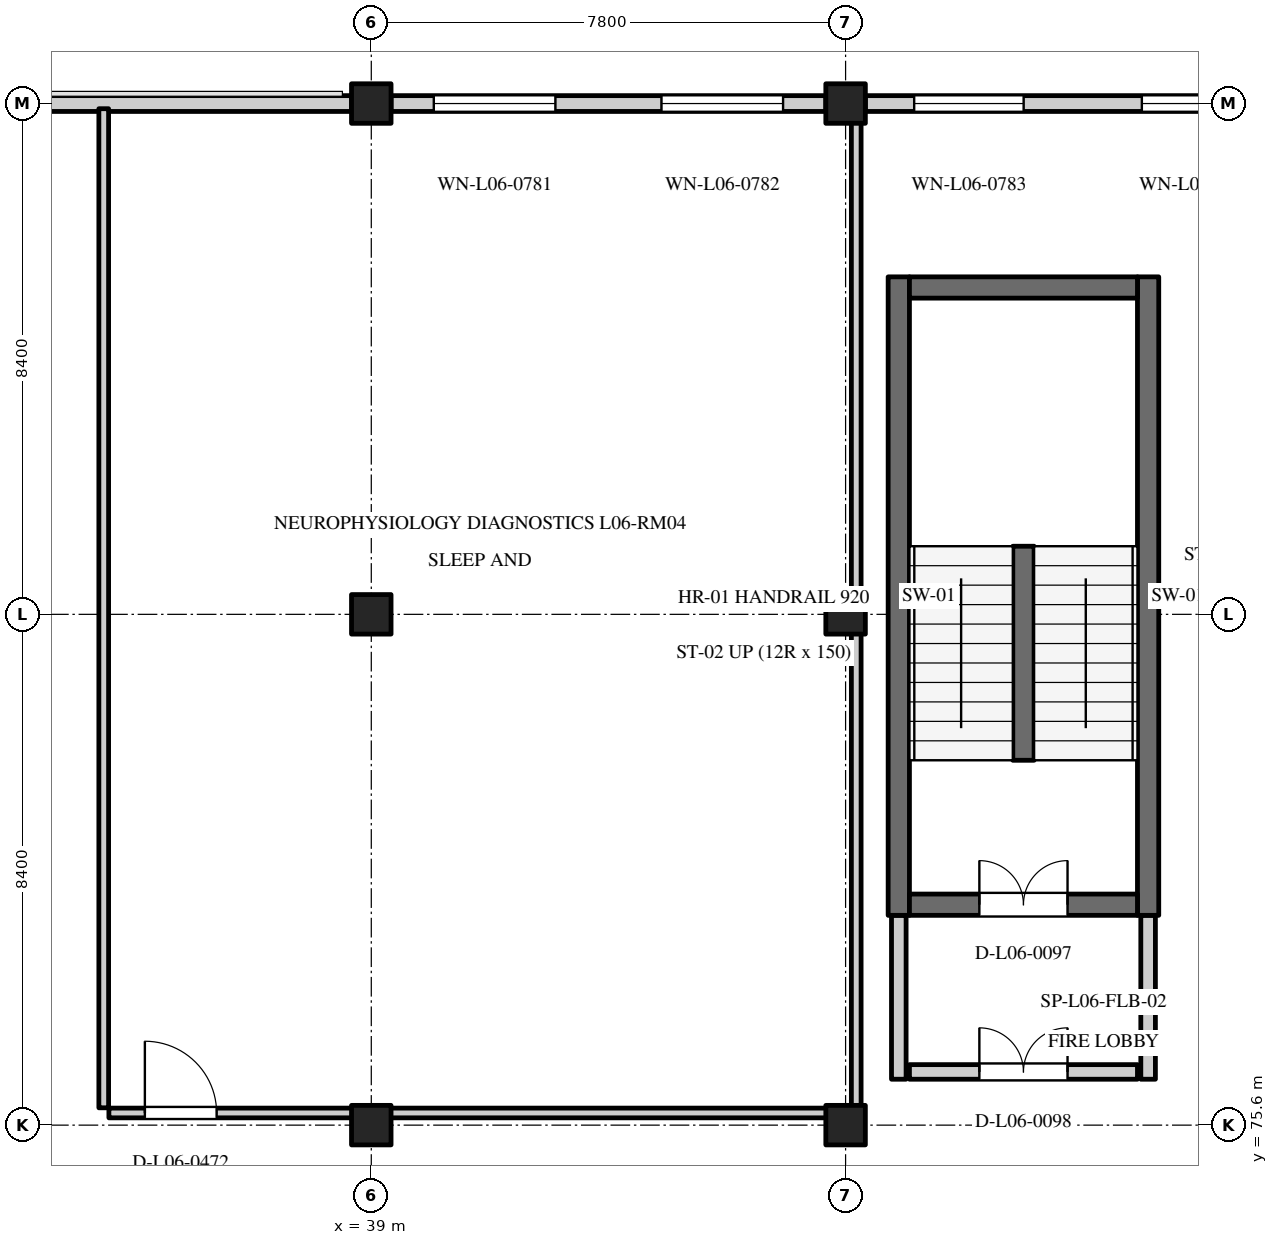
"""IFC4 building model, lengths in metres.
Left out: names, types, materials, properties, quantities, classifications, styles, units other than length and angle.
Written with IfcOpenShell. Run it as: python <this file> out.ifc"""

import sys

from ifc_helpers import new_model, si_unit, direction, frame, frame_2d, origin, origin_2d, place, context, subcontext, project, spatial, rectangle, extrude, element, fill, save


model = new_model("IFC4")
c1 = context("Model", 3, precision=1e-05, world=origin(), true_north=direction((0.0, 1.0)))
c2 = subcontext(c1, "Body", "Model", "MODEL_VIEW")
j1 = project(units=[si_unit("LENGTHUNIT", "METRE"), si_unit("PLANEANGLEUNIT", "RADIAN")], contexts=[c1])
p1 = place(None, origin())
s1 = spatial("IfcSite", under=j1, at=p1, CompositionType="ELEMENT")
p2 = place(p1, origin())
s2 = spatial("IfcBuilding", under=s1, at=p2, CompositionType="ELEMENT")
p3 = place(p2, frame((0.0, 0.0, 26.1)))
s3 = spatial("IfcBuildingStorey", under=s2, at=p3, CompositionType="ELEMENT", Elevation=26.1)
for number, where, z_axis, x_axis in (
    (1, (39.0, 75.6, 0.0), (0.0, 0.0, 1.0), (1.0, 0.0, 0.0)),
    (2, (39.0, 84.0, 0.0), (0.0, 0.0, 1.0), (1.0, 0.0, 0.0)),
    (3, (39.0, 92.4, 0.0), (0.0, 0.0, 1.0), (1.0, 0.0, 0.0)),
    (4, (46.8, 75.6, 0.0), (0.0, 0.0, 1.0), (1.0, 0.0, 0.0)),
    (5, (46.8, 84.0, 0.0), (0.0, 0.0, 1.0), (1.0, 0.0, 0.0)),
    (6, (46.8, 92.4, 0.0), (0.0, 0.0, 1.0), (1.0, 0.0, 0.0)),
):
    element("IfcColumn", number, at=place(p3, frame(where, z_axis=z_axis, x_axis=x_axis)), inside=s3, PredefinedType="COLUMN", context=c2, shape_type="SweptSolid", body=[
        extrude(rectangle(XDim=0.65, YDim=0.65, at=origin_2d()), origin(), (0.0, 0.0, 1.0), 3.6),
    ])
p4 = place(p3, frame((31.525, 92.4, 0.0), z_axis=(0.0, 0.0, 1.0), x_axis=(1.0, 0.0, 0.0)))
e7 = element("IfcWall", 7, at=p4, inside=s3, PredefinedType="STANDARD", context=c2, shape_type="SweptSolid", body=[
    extrude(rectangle(XDim=7.15, YDim=0.26, at=frame_2d((3.575, 0.0))), origin(), (0.0, 0.0, 1.0), 2.75),
])
p5 = place(p3, frame((39.325, 92.4, 0.0), z_axis=(0.0, 0.0, 1.0), x_axis=(1.0, 0.0, 0.0)))
e8 = element("IfcWall", 8, at=p5, inside=s3, PredefinedType="STANDARD", context=c2, shape_type="SweptSolid", body=[
    extrude(rectangle(XDim=7.15, YDim=0.26, at=frame_2d((3.575, 0.0))), origin(), (0.0, 0.0, 1.0), 2.75),
])
p6 = place(p5, frame((0.703, 0.0, 0.8)))
e9 = element("IfcOpeningElement", 9, at=p6, cuts=e8, PredefinedType="OPENING", context=c2, shape_type="SweptSolid", body=[
    extrude(rectangle(XDim=2.0, YDim=1.45, at=frame_2d((1.0, 0.725))), frame((0.0, 0.142, 0.0), z_axis=(0.0, -1.0, 0.0), x_axis=(1.0, 0.0, 0.0)), (0.0, 0.0, 1.0), 0.284),
])
p7 = place(p5, frame((4.447, 0.0, 0.8)))
e10 = element("IfcOpeningElement", 10, at=p7, cuts=e8, PredefinedType="OPENING", context=c2, shape_type="SweptSolid", body=[
    extrude(rectangle(XDim=2.0, YDim=1.45, at=frame_2d((1.0, 0.725))), frame((0.0, 0.142, 0.0), z_axis=(0.0, -1.0, 0.0), x_axis=(1.0, 0.0, 0.0)), (0.0, 0.0, 1.0), 0.284),
])
p8 = place(p3, frame((47.125, 92.4, 0.0), z_axis=(0.0, 0.0, 1.0), x_axis=(1.0, 0.0, 0.0)))
e11 = element("IfcWall", 11, at=p8, inside=s3, PredefinedType="STANDARD", context=c2, shape_type="SweptSolid", body=[
    extrude(rectangle(XDim=7.125, YDim=0.26, at=frame_2d((3.562, 0.0))), origin(), (0.0, 0.0, 1.0), 2.75),
])
p9 = place(p8, frame((0.803, 0.0, 0.8)))
e12 = element("IfcOpeningElement", 12, at=p9, cuts=e11, PredefinedType="OPENING", context=c2, shape_type="SweptSolid", body=[
    extrude(rectangle(XDim=1.8, YDim=1.65, at=frame_2d((0.9, 0.825))), frame((0.0, 0.142, 0.0), z_axis=(0.0, -1.0, 0.0), x_axis=(1.0, 0.0, 0.0)), (0.0, 0.0, 1.0), 0.284),
])
p10 = place(p8, frame((4.547, 0.0, 0.8)))
e13 = element("IfcOpeningElement", 13, at=p10, cuts=e11, PredefinedType="OPENING", context=c2, shape_type="SweptSolid", body=[
    extrude(rectangle(XDim=1.8, YDim=1.65, at=frame_2d((0.9, 0.825))), frame((0.0, 0.142, 0.0), z_axis=(0.0, -1.0, 0.0), x_axis=(1.0, 0.0, 0.0)), (0.0, 0.0, 1.0), 0.284),
])
for number, where, z_axis, x_axis in (
    (14, (47.675, 79.05, 0.0), (0.0, 0.0, 1.0), (0.0, 1.0, 0.0)),
    (15, (51.775, 79.05, 0.0), (0.0, 0.0, 1.0), (0.0, 1.0, 0.0)),
):
    element("IfcWall", number, at=place(p3, frame(where, z_axis=z_axis, x_axis=x_axis)), inside=s3, PredefinedType="SHEAR", context=c2, shape_type="SweptSolid", body=[
        extrude(rectangle(XDim=10.5, YDim=0.35, at=frame_2d((5.25, 0.0))), origin(), (0.0, 0.0, 1.0), 3.6),
    ])
p11 = place(p3, frame((47.85, 89.375, 0.0), z_axis=(0.0, 0.0, 1.0), x_axis=(1.0, 0.0, 0.0)))
e16 = element("IfcWall", 16, at=p11, inside=s3, PredefinedType="SHEAR", context=c2, shape_type="SweptSolid", body=[
    extrude(rectangle(XDim=3.75, YDim=0.35, at=frame_2d((1.875, 0.0))), origin(), (0.0, 0.0, 1.0), 3.6),
])
p12 = place(p3, frame((47.85, 79.225, 0.0), z_axis=(0.0, 0.0, 1.0), x_axis=(1.0, 0.0, 0.0)))
e17 = element("IfcWall", 17, at=p12, inside=s3, PredefinedType="SHEAR", context=c2, shape_type="SweptSolid", body=[
    extrude(rectangle(XDim=3.75, YDim=0.35, at=frame_2d((1.875, 0.0))), origin(), (0.0, 0.0, 1.0), 3.3),
])
p13 = place(p12, frame((1.15, 0.0, 0.0)))
e18 = element("IfcOpeningElement", 18, at=p13, cuts=e17, PredefinedType="OPENING", context=c2, shape_type="SweptSolid", body=[
    extrude(rectangle(XDim=1.45, YDim=2.2, at=frame_2d((0.725, 1.1))), frame((0.0, 0.187, 0.0), z_axis=(0.0, -1.0, 0.0), x_axis=(1.0, 0.0, 0.0)), (0.0, 0.0, 1.0), 0.374),
])
for number, where, z_axis, x_axis in (
    (19, (47.675, 76.355, 0.0), (0.0, 0.0, 1.0), (0.0, 1.0, 0.0)),
    (20, (51.775, 76.355, 0.0), (0.0, 0.0, 1.0), (0.0, 1.0, 0.0)),
):
    element("IfcWall", number, at=place(p3, frame(where, z_axis=z_axis, x_axis=x_axis)), inside=s3, PredefinedType="STANDARD", context=c2, shape_type="SweptSolid", body=[
        extrude(rectangle(XDim=2.695, YDim=0.24, at=frame_2d((1.348, 0.0))), origin(), (0.0, 0.0, 1.0), 3.3),
    ])
p14 = place(p3, frame((47.85, 76.475, 0.0), z_axis=(0.0, 0.0, 1.0), x_axis=(1.0, 0.0, 0.0)))
e21 = element("IfcWall", 21, at=p14, inside=s3, PredefinedType="STANDARD", context=c2, shape_type="SweptSolid", body=[
    extrude(rectangle(XDim=3.75, YDim=0.24, at=frame_2d((1.875, 0.0))), origin(), (0.0, 0.0, 1.0), 3.3),
])
p15 = place(p14, frame((1.15, 0.0, 0.0)))
e22 = element("IfcOpeningElement", 22, at=p15, cuts=e21, PredefinedType="OPENING", context=c2, shape_type="SweptSolid", body=[
    extrude(rectangle(XDim=1.45, YDim=2.2, at=frame_2d((0.725, 1.1))), frame((0.0, 0.132, 0.0), z_axis=(0.0, -1.0, 0.0), x_axis=(1.0, 0.0, 0.0)), (0.0, 0.0, 1.0), 0.264),
])
p16 = place(p3, frame((49.725, 81.6, 0.0), z_axis=(0.0, 0.0, 1.0), x_axis=(0.0, 1.0, 0.0)))
e23 = element("IfcWall", 23, at=p16, inside=s3, PredefinedType="SHEAR", context=c2, shape_type="SweptSolid", body=[
    extrude(rectangle(XDim=3.52, YDim=0.35, at=frame_2d((1.76, 0.0))), origin(), (0.0, 0.0, 1.0), 3.6),
])
p17 = place(p3, frame((34.685, 75.8, 0.0), z_axis=(0.0, 0.0, 1.0), x_axis=(1.0, 0.0, 0.0)))
e24 = element("IfcWall", 24, at=p17, inside=s3, PredefinedType="PARTITIONING", context=c2, shape_type="SweptSolid", body=[
    extrude(rectangle(XDim=12.205, YDim=0.16, at=frame_2d((6.103, 0.0))), origin(), (0.0, 0.0, 1.0), 2.65),
])
p18 = place(p17, frame((0.592, 0.0, 0.0)))
e25 = element("IfcOpeningElement", 25, at=p18, cuts=e24, PredefinedType="OPENING", context=c2, shape_type="SweptSolid", body=[
    extrude(rectangle(XDim=1.18, YDim=2.2, at=frame_2d((0.59, 1.1))), frame((0.0, 0.092, 0.0), z_axis=(0.0, -1.0, 0.0), x_axis=(1.0, 0.0, 0.0)), (0.0, 0.0, 1.0), 0.184),
])
p19 = place(p3, frame((38.715, 92.4, 0.0), z_axis=(0.0, 0.0, 1.0), x_axis=(1.0, 0.0, 0.0)))
e26 = element("IfcWall", 26, at=p19, inside=s3, PredefinedType="PARTITIONING", context=c2, shape_type="SweptSolid", body=[
    extrude(rectangle(XDim=0.57, YDim=0.16, at=frame_2d((0.285, 0.0))), origin(), (0.0, 0.0, 1.0), 2.65),
])
for number, where, z_axis, x_axis in (
    (27, (34.6, 75.885, 0.0), (0.0, 0.0, 1.0), (0.0, 1.0, 0.0)),
    (28, (46.975, 75.885, 0.0), (0.0, 0.0, 1.0), (0.0, 1.0, 0.0)),
):
    element("IfcWall", number, at=place(p3, frame(where, z_axis=z_axis, x_axis=x_axis)), inside=s3, PredefinedType="PARTITIONING", context=c2, shape_type="SweptSolid", body=[
        extrude(rectangle(XDim=16.43, YDim=0.16, at=frame_2d((8.215, 0.0))), origin(), (0.0, 0.0, 1.0), 3.28),
    ])
p20 = place(p6, origin())
e29 = element("IfcWindow", 29, at=p20, inside=s3, PartitioningType="DOUBLE_PANEL_VERTICAL", PredefinedType="WINDOW", context=c2, shape_type="SweptSolid", body=[
    extrude(rectangle(XDim=2.0, YDim=1.45, at=frame_2d((1.0, 0.725))), frame((0.0, 0.03, 0.0), z_axis=(0.0, -1.0, 0.0), x_axis=(1.0, 0.0, 0.0)), (0.0, 0.0, 1.0), 0.06),
])
fill(e9, e29)
p21 = place(p7, origin())
e30 = element("IfcWindow", 30, at=p21, inside=s3, PartitioningType="DOUBLE_PANEL_VERTICAL", PredefinedType="WINDOW", context=c2, shape_type="SweptSolid", body=[
    extrude(rectangle(XDim=2.0, YDim=1.45, at=frame_2d((1.0, 0.725))), frame((0.0, 0.03, 0.0), z_axis=(0.0, -1.0, 0.0), x_axis=(1.0, 0.0, 0.0)), (0.0, 0.0, 1.0), 0.06),
])
fill(e10, e30)
p22 = place(p9, origin())
e31 = element("IfcWindow", 31, at=p22, inside=s3, PartitioningType="DOUBLE_PANEL_VERTICAL", PredefinedType="WINDOW", context=c2, shape_type="SweptSolid", body=[
    extrude(rectangle(XDim=1.8, YDim=1.65, at=frame_2d((0.9, 0.825))), frame((0.0, 0.03, 0.0), z_axis=(0.0, -1.0, 0.0), x_axis=(1.0, 0.0, 0.0)), (0.0, 0.0, 1.0), 0.06),
])
fill(e12, e31)
p23 = place(p10, origin())
e32 = element("IfcWindow", 32, at=p23, inside=s3, PartitioningType="DOUBLE_PANEL_VERTICAL", PredefinedType="WINDOW", context=c2, shape_type="SweptSolid", body=[
    extrude(rectangle(XDim=1.8, YDim=1.65, at=frame_2d((0.9, 0.825))), frame((0.0, 0.03, 0.0), z_axis=(0.0, -1.0, 0.0), x_axis=(1.0, 0.0, 0.0)), (0.0, 0.0, 1.0), 0.06),
])
fill(e13, e32)
p24 = place(p13, origin())
e33 = element("IfcDoor", 33, at=p24, inside=s3, OperationType="DOUBLE_DOOR_SINGLE_SWING", PredefinedType="DOOR", context=c2, shape_type="SweptSolid", body=[
    extrude(rectangle(XDim=1.45, YDim=2.2, at=frame_2d((0.725, 1.1))), frame((0.0, 0.025, 0.0), z_axis=(0.0, -1.0, 0.0), x_axis=(1.0, 0.0, 0.0)), (0.0, 0.0, 1.0), 0.05),
])
fill(e18, e33)
p25 = place(p15, origin())
e34 = element("IfcDoor", 34, at=p25, inside=s3, OperationType="DOUBLE_DOOR_SINGLE_SWING", PredefinedType="DOOR", context=c2, shape_type="SweptSolid", body=[
    extrude(rectangle(XDim=1.45, YDim=2.2, at=frame_2d((0.725, 1.1))), frame((0.0, 0.025, 0.0), z_axis=(0.0, -1.0, 0.0), x_axis=(1.0, 0.0, 0.0)), (0.0, 0.0, 1.0), 0.05),
])
fill(e22, e34)
p26 = place(p18, origin())
e35 = element("IfcDoor", 35, at=p26, inside=s3, OperationType="SINGLE_SWING_LEFT", PredefinedType="DOOR", context=c2, shape_type="SweptSolid", body=[
    extrude(rectangle(XDim=1.18, YDim=2.2, at=frame_2d((0.59, 1.1))), frame((0.0, 0.025, 0.0), z_axis=(0.0, -1.0, 0.0), x_axis=(1.0, 0.0, 0.0)), (0.0, 0.0, 1.0), 0.05),
])
fill(e25, e35)
save(model, sys.argv[1])
